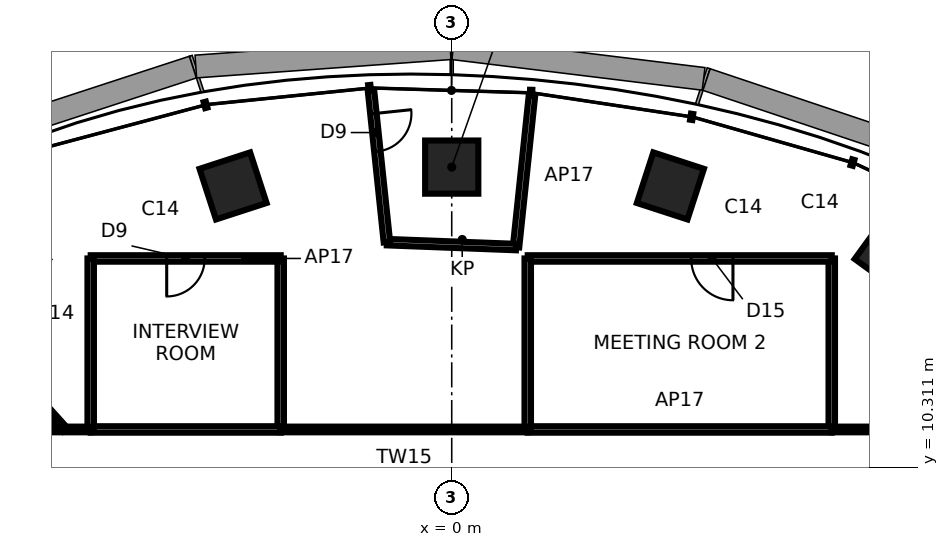
"""IFC4 building model, lengths in metres.
Left out: names, types, materials, properties, quantities, classifications, styles, units other than length and angle.
Written with IfcOpenShell. Run it as: python <this file> out.ifc"""

import sys

from ifc_helpers import new_model, si_unit, direction, frame, frame_2d, origin, origin_2d, place, context, subcontext, project, spatial, rectangle, extrude, element, fill, save


model = new_model("IFC4")
c1 = context("Model", 3, precision=1e-05, world=origin(), true_north=direction((0.0, 1.0)))
c2 = subcontext(c1, "Body", "Model", "MODEL_VIEW")
j1 = project(units=[si_unit("LENGTHUNIT", "METRE"), si_unit("PLANEANGLEUNIT", "RADIAN")], contexts=[c1])
p1 = place(None, origin())
s1 = spatial("IfcSite", under=j1, at=p1, CompositionType="ELEMENT")
p2 = place(p1, origin())
s2 = spatial("IfcBuilding", under=s1, at=p2, CompositionType="ELEMENT")
p3 = place(p2, frame((0.0, 0.0, 211.1)))
s3 = spatial("IfcBuildingStorey", under=s2, at=p3, CompositionType="ELEMENT", Elevation=211.1)
for number, where, z_axis, x_axis in (
    (1, (11.581, 15.94, 0.0), (0.0, 0.0, 1.0), (0.588, 0.809, 0.0)),
    (2, (5.754, 17.708, 0.0), (0.0, 0.0, 1.0), (0.309, 0.951, 0.0)),
    (3, (0.0, 18.204, 0.0), (0.0, 0.0, 1.0), (0.0, 1.0, 0.0)),
    (4, (-5.754, 17.708, 0.0), (0.0, 0.0, 1.0), (-0.309, 0.951, 0.0)),
):
    element("IfcColumn", number, at=place(p3, frame(where, z_axis=z_axis, x_axis=x_axis)), inside=s3, PredefinedType="COLUMN", context=c2, shape_type="SweptSolid", body=[
        extrude(rectangle(XDim=1.4, YDim=1.4, at=origin_2d()), origin(), (0.0, 0.0, 1.0), 3.9),
    ])
p4 = place(p3, frame((16.0, 11.3, 0.0), z_axis=(0.0, 0.0, 1.0), x_axis=(-1.0, 0.0, 0.0)))
e5 = element("IfcWall", 5, at=p4, inside=s3, PredefinedType="PARTITIONING", context=c2, shape_type="SweptSolid", body=[
    extrude(rectangle(XDim=6.0, YDim=0.15, at=frame_2d((3.0, 0.0))), origin(), (0.0, 0.0, 1.0), 3.74),
])
p5 = place(p3, frame((10.0, 11.3, 0.0), z_axis=(0.0, 0.0, 1.0), x_axis=(0.0, 1.0, 0.0)))
e6 = element("IfcWall", 6, at=p5, inside=s3, PredefinedType="PARTITIONING", context=c2, shape_type="SweptSolid", body=[
    extrude(rectangle(XDim=4.5, YDim=0.17, at=frame_2d((2.25, 0.0))), origin(), (0.0, 0.0, 1.0), 3.74),
])
p6 = place(p3, frame((2.0, 11.3, 0.0), z_axis=(0.0, 0.0, 1.0), x_axis=(1.0, 0.0, 0.0)))
e7 = element("IfcWall", 7, at=p6, inside=s3, PredefinedType="PARTITIONING", context=c2, shape_type="SweptSolid", body=[
    extrude(rectangle(XDim=8.0, YDim=0.17, at=frame_2d((4.0, 0.0))), origin(), (0.0, 0.0, 1.0), 3.74),
])
p7 = place(p3, frame((10.0, 15.8, 0.0), z_axis=(0.0, 0.0, 1.0), x_axis=(-1.0, 0.0, 0.0)))
e8 = element("IfcWall", 8, at=p7, inside=s3, PredefinedType="PARTITIONING", context=c2, shape_type="SweptSolid", body=[
    extrude(rectangle(XDim=8.0, YDim=0.17, at=frame_2d((4.0, 0.0))), origin(), (0.0, 0.0, 1.0), 3.74),
])
p8 = place(p7, frame((2.6, 0.0, 0.0)))
e9 = element("IfcOpeningElement", 9, at=p8, cuts=e8, PredefinedType="OPENING", context=c2, shape_type="SweptSolid", body=[
    extrude(rectangle(XDim=1.1, YDim=2.4, at=frame_2d((0.55, 1.2))), frame((0.0, 0.095, 0.0), z_axis=(0.0, -1.0, 0.0), x_axis=(1.0, 0.0, 0.0)), (0.0, 0.0, 1.0), 0.19),
])
p9 = place(p3, frame((2.0, 15.8, 0.0), z_axis=(0.0, 0.0, 1.0), x_axis=(0.0, -1.0, 0.0)))
e10 = element("IfcWall", 10, at=p9, inside=s3, PredefinedType="PARTITIONING", context=c2, shape_type="SweptSolid", body=[
    extrude(rectangle(XDim=4.5, YDim=0.17, at=frame_2d((2.25, 0.0))), origin(), (0.0, 0.0, 1.0), 3.74),
])
p10 = place(p3, frame((1.692, 16.1, 0.0), z_axis=(0.0, 0.0, 1.0), x_axis=(0.104548171712, 0.99451982373, 0.0)))
e11 = element("IfcWall", 11, at=p10, inside=s3, PredefinedType="PARTITIONING", context=c2, shape_type="SweptSolid", body=[
    extrude(rectangle(XDim=4.0, YDim=0.17, at=frame_2d((2.0, 0.0))), origin(), (0.0, 0.0, 1.0), 3.74),
])
p11 = place(p3, frame((-1.706, 16.229, 0.0), z_axis=(0.0, 0.0, 1.0), x_axis=(0.999275737391, -0.038052603881, 0.0)))
e12 = element("IfcWall", 12, at=p11, inside=s3, PredefinedType="PARTITIONING", context=c2, shape_type="SweptSolid", body=[
    extrude(rectangle(XDim=3.4, YDim=0.17, at=frame_2d((1.7, 0.0))), origin(), (0.0, 0.0, 1.0), 3.74),
])
p12 = place(p3, frame((-2.124, 20.207, 0.0), z_axis=(0.0, 0.0, 1.0), x_axis=(0.104494148666, -0.99452550138, 0.0)))
e13 = element("IfcWall", 13, at=p12, inside=s3, PredefinedType="PARTITIONING", context=c2, shape_type="SweptSolid", body=[
    extrude(rectangle(XDim=4.0, YDim=0.17, at=frame_2d((2.0, 0.0))), origin(), (0.0, 0.0, 1.0), 3.74),
])
p13 = place(p12, frame((0.6, 0.0, 0.0)))
e14 = element("IfcOpeningElement", 14, at=p13, cuts=e13, PredefinedType="OPENING", context=c2, shape_type="SweptSolid", body=[
    extrude(rectangle(XDim=1.0, YDim=2.4, at=frame_2d((0.5, 1.2))), frame((0.0, 0.095, 0.0), z_axis=(0.0, -1.0, 0.0), x_axis=(1.0, 0.0, 0.0)), (0.0, 0.0, 1.0), 0.19),
])
p14 = place(p3, frame((2.0, 11.3, 0.0), z_axis=(0.0, 0.0, 1.0), x_axis=(-1.0, 0.0, 0.0)))
e15 = element("IfcWall", 15, at=p14, inside=s3, PredefinedType="PARTITIONING", context=c2, shape_type="SweptSolid", body=[
    extrude(rectangle(XDim=6.5, YDim=0.15, at=frame_2d((3.25, 0.0))), origin(), (0.0, 0.0, 1.0), 3.74),
])
p15 = place(p3, frame((-4.5, 11.3, 0.0), z_axis=(0.0, 0.0, 1.0), x_axis=(0.0, 1.0, 0.0)))
e16 = element("IfcWall", 16, at=p15, inside=s3, PredefinedType="PARTITIONING", context=c2, shape_type="SweptSolid", body=[
    extrude(rectangle(XDim=4.5, YDim=0.17, at=frame_2d((2.25, 0.0))), origin(), (0.0, 0.0, 1.0), 3.74),
])
p16 = place(p3, frame((-4.5, 15.8, 0.0), z_axis=(0.0, 0.0, 1.0), x_axis=(-1.0, 0.0, 0.0)))
e17 = element("IfcWall", 17, at=p16, inside=s3, PredefinedType="PARTITIONING", context=c2, shape_type="SweptSolid", body=[
    extrude(rectangle(XDim=5.0, YDim=0.17, at=frame_2d((2.5, 0.0))), origin(), (0.0, 0.0, 1.0), 3.74),
])
p17 = place(p16, frame((2.0, 0.0, 0.0)))
e18 = element("IfcOpeningElement", 18, at=p17, cuts=e17, PredefinedType="OPENING", context=c2, shape_type="SweptSolid", body=[
    extrude(rectangle(XDim=1.0, YDim=2.4, at=frame_2d((0.5, 1.2))), frame((0.0, 0.095, 0.0), z_axis=(0.0, -1.0, 0.0), x_axis=(1.0, 0.0, 0.0)), (0.0, 0.0, 1.0), 0.19),
])
p18 = place(p3, frame((-9.5, 11.3, 0.0), z_axis=(0.0, 0.0, 1.0), x_axis=(1.0, 0.0, 0.0)))
e19 = element("IfcWall", 19, at=p18, inside=s3, PredefinedType="PARTITIONING", context=c2, shape_type="SweptSolid", body=[
    extrude(rectangle(XDim=5.0, YDim=0.17, at=frame_2d((2.5, 0.0))), origin(), (0.0, 0.0, 1.0), 3.74),
])
p19 = place(p3, frame((-9.5, 15.8, 0.0), z_axis=(0.0, 0.0, 1.0), x_axis=(0.0, -1.0, 0.0)))
e20 = element("IfcWall", 20, at=p19, inside=s3, PredefinedType="PARTITIONING", context=c2, shape_type="SweptSolid", body=[
    extrude(rectangle(XDim=4.5, YDim=0.17, at=frame_2d((2.25, 0.0))), origin(), (0.0, 0.0, 1.0), 3.74),
])
p20 = place(p3, frame((-10.175, 11.3, 0.0), z_axis=(0.0, 0.0, 1.0), x_axis=(-0.669133581883, 0.743142146293, 0.0)))
e21 = element("IfcWall", 21, at=p20, inside=s3, PredefinedType="PARTITIONING", context=c2, shape_type="SweptSolid", body=[
    extrude(rectangle(XDim=7.109, YDim=0.15, at=frame_2d((3.554, 0.0))), origin(), (0.0, 0.0, 1.0), 3.74),
])
p21 = place(p3, frame((-9.5, 11.3, 0.0), z_axis=(0.0, 0.0, 1.0), x_axis=(-1.0, 0.0, 0.0)))
e22 = element("IfcWall", 22, at=p21, inside=s3, PredefinedType="PARTITIONING", context=c2, shape_type="SweptSolid", body=[
    extrude(rectangle(XDim=4.7, YDim=0.15, at=frame_2d((2.35, 0.0))), origin(), (0.0, 0.0, 1.0), 3.74),
])
p22 = place(p13, origin())
e23 = element("IfcDoor", 23, at=p22, inside=s3, OperationType="SINGLE_SWING_LEFT", PredefinedType="DOOR", context=c2, shape_type="SweptSolid", body=[
    extrude(rectangle(XDim=1.0, YDim=2.4, at=frame_2d((0.5, 1.2))), frame((0.0, 0.025, 0.0), z_axis=(0.0, -1.0, 0.0), x_axis=(1.0, 0.0, 0.0)), (0.0, 0.0, 1.0), 0.05),
])
fill(e14, e23)
p23 = place(p8, origin())
e24 = element("IfcDoor", 24, at=p23, inside=s3, OperationType="SINGLE_SWING_LEFT", PredefinedType="DOOR", context=c2, shape_type="SweptSolid", body=[
    extrude(rectangle(XDim=1.1, YDim=2.4, at=frame_2d((0.55, 1.2))), frame((0.0, 0.025, 0.0), z_axis=(0.0, -1.0, 0.0), x_axis=(1.0, 0.0, 0.0)), (0.0, 0.0, 1.0), 0.05),
])
fill(e9, e24)
p24 = place(p17, origin())
e25 = element("IfcDoor", 25, at=p24, inside=s3, OperationType="SINGLE_SWING_RIGHT", PredefinedType="DOOR", context=c2, shape_type="SweptSolid", body=[
    extrude(rectangle(XDim=1.0, YDim=2.4, at=frame_2d((0.5, 1.2))), frame((0.0, 0.025, 0.0), z_axis=(0.0, -1.0, 0.0), x_axis=(1.0, 0.0, 0.0)), (0.0, 0.0, 1.0), 0.05),
])
fill(e18, e25)
save(model, sys.argv[1])
